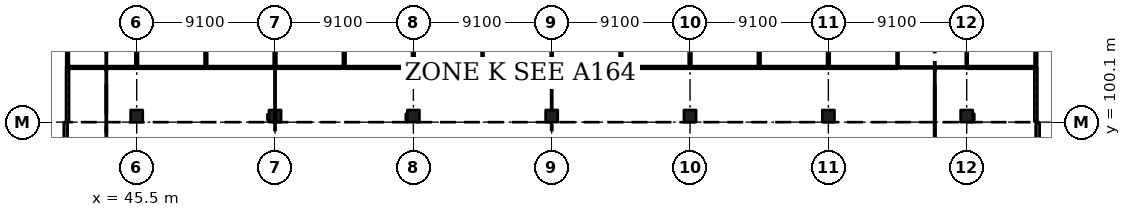
"""IFC4 building model, lengths in metres.
Left out: names, types, materials, properties, quantities, classifications, styles, units other than length and angle.
Written with IfcOpenShell. Run it as: python <this file> out.ifc"""

import sys

from ifc_helpers import new_model, si_unit, direction, frame, frame_2d, origin, origin_2d, place, context, subcontext, project, spatial, rectangle, extrude, element, fill, save


model = new_model("IFC4")
c1 = context("Model", 3, precision=1e-05, world=origin(), true_north=direction((0.0, 1.0)))
c2 = subcontext(c1, "Body", "Model", "MODEL_VIEW")
j1 = project(units=[si_unit("LENGTHUNIT", "METRE"), si_unit("PLANEANGLEUNIT", "RADIAN")], contexts=[c1])
p1 = place(None, origin())
s1 = spatial("IfcSite", under=j1, at=p1, CompositionType="ELEMENT")
p2 = place(p1, origin())
s2 = spatial("IfcBuilding", under=s1, at=p2, CompositionType="ELEMENT")
p3 = place(p2, frame((0.0, 0.0, 20.02)))
s3 = spatial("IfcBuildingStorey", under=s2, at=p3, CompositionType="ELEMENT", Elevation=20.02)
for number, where, z_axis, x_axis in (
    (1, (45.5, 100.5, 0.0), (0.0, 0.0, 1.0), (1.0, 0.0, 0.0)),
    (2, (54.6, 100.5, 0.0), (0.0, 0.0, 1.0), (1.0, 0.0, 0.0)),
    (3, (63.7, 100.5, 0.0), (0.0, 0.0, 1.0), (1.0, 0.0, 0.0)),
    (4, (72.8, 100.5, 0.0), (0.0, 0.0, 1.0), (1.0, 0.0, 0.0)),
    (5, (81.9, 100.5, 0.0), (0.0, 0.0, 1.0), (1.0, 0.0, 0.0)),
    (6, (91.0, 100.5, 0.0), (0.0, 0.0, 1.0), (1.0, 0.0, 0.0)),
    (7, (100.1, 100.5, 0.0), (0.0, 0.0, 1.0), (1.0, 0.0, 0.0)),
):
    element("IfcColumn", number, at=place(p3, frame(where, z_axis=z_axis, x_axis=x_axis)), inside=s3, PredefinedType="COLUMN", context=c2, shape_type="SweptSolid", body=[
        extrude(rectangle(XDim=0.8, YDim=0.8, at=origin_2d()), origin(), (0.0, 0.0, 1.0), 4.55),
    ])
for number, where, z_axis, x_axis in (
    (8, (40.825, 68.25, 0.0), (0.0, 0.0, 1.0), (0.0, 1.0, 0.0)),
    (9, (104.775, 68.25, 0.0), (0.0, 0.0, 1.0), (0.0, 1.0, 0.0)),
):
    element("IfcWall", number, at=place(p3, frame(where, z_axis=z_axis, x_axis=x_axis)), inside=s3, PredefinedType="SHEAR", context=c2, shape_type="SweptSolid", body=[
        extrude(rectangle(XDim=31.85, YDim=0.25, at=frame_2d((15.925, 0.0))), origin(), (0.0, 0.0, 1.0), 4.55),
    ])
p4 = place(p3, frame((40.95, 103.7, 0.0), z_axis=(0.0, 0.0, 1.0), x_axis=(0.0, -1.0, 0.0)))
e10 = element("IfcWall", 10, at=p4, inside=s3, PredefinedType="PARTITIONING", context=c2, shape_type="SweptSolid", body=[
    extrude(rectangle(XDim=3.57, YDim=0.2, at=frame_2d((1.785, 0.0))), origin(), (0.0, 0.0, 1.0), 4.25),
])
p5 = place(p4, frame((0.55, 0.0, 0.0)))
e11 = element("IfcOpeningElement", 11, at=p5, cuts=e10, PredefinedType="OPENING", context=c2, shape_type="SweptSolid", body=[
    extrude(rectangle(XDim=2.4, YDim=2.4, at=frame_2d((1.2, 1.2))), frame((0.0, 0.11, 0.0), z_axis=(0.0, -1.0, 0.0), x_axis=(1.0, 0.0, 0.0)), (0.0, 0.0, 1.0), 0.22),
])
p6 = place(p3, frame((40.95, 103.7, 0.0), z_axis=(0.0, 0.0, 1.0), x_axis=(0.0, 1.0, 0.0)))
e12 = element("IfcWall", 12, at=p6, inside=s3, PredefinedType="PARTITIONING", context=c2, shape_type="SweptSolid", body=[
    extrude(rectangle(XDim=5.47, YDim=0.175, at=frame_2d((2.735, 0.0))), origin(), (0.0, 0.0, 1.0), 4.25),
])
p7 = place(p3, frame((41.05, 103.7, 0.0), z_axis=(0.0, 0.0, 1.0), x_axis=(1.0, 0.0, 0.0)))
e13 = element("IfcWall", 13, at=p7, inside=s3, PredefinedType="PARTITIONING", context=c2, shape_type="SweptSolid", body=[
    extrude(rectangle(XDim=27.2, YDim=0.175, at=frame_2d((13.6, 0.0))), origin(), (0.0, 0.0, 1.0), 4.25),
])
p8 = place(p7, frame((1.65, 0.0, 0.0)))
e14 = element("IfcOpeningElement", 14, at=p8, cuts=e13, PredefinedType="OPENING", context=c2, shape_type="SweptSolid", body=[
    extrude(rectangle(XDim=1.1, YDim=2.4, at=frame_2d((0.55, 1.2))), frame((0.0, 0.097, 0.0), z_axis=(0.0, -1.0, 0.0), x_axis=(1.0, 0.0, 0.0)), (0.0, 0.0, 1.0), 0.195),
])
p9 = place(p7, frame((6.2, 0.0, 0.0)))
e15 = element("IfcOpeningElement", 15, at=p9, cuts=e13, PredefinedType="OPENING", context=c2, shape_type="SweptSolid", body=[
    extrude(rectangle(XDim=1.1, YDim=2.4, at=frame_2d((0.55, 1.2))), frame((0.0, 0.097, 0.0), z_axis=(0.0, -1.0, 0.0), x_axis=(1.0, 0.0, 0.0)), (0.0, 0.0, 1.0), 0.195),
])
p10 = place(p7, frame((10.75, 0.0, 0.0)))
e16 = element("IfcOpeningElement", 16, at=p10, cuts=e13, PredefinedType="OPENING", context=c2, shape_type="SweptSolid", body=[
    extrude(rectangle(XDim=1.1, YDim=2.4, at=frame_2d((0.55, 1.2))), frame((0.0, 0.097, 0.0), z_axis=(0.0, -1.0, 0.0), x_axis=(1.0, 0.0, 0.0)), (0.0, 0.0, 1.0), 0.195),
])
p11 = place(p7, frame((15.3, 0.0, 0.0)))
e17 = element("IfcOpeningElement", 17, at=p11, cuts=e13, PredefinedType="OPENING", context=c2, shape_type="SweptSolid", body=[
    extrude(rectangle(XDim=1.1, YDim=2.4, at=frame_2d((0.55, 1.2))), frame((0.0, 0.097, 0.0), z_axis=(0.0, -1.0, 0.0), x_axis=(1.0, 0.0, 0.0)), (0.0, 0.0, 1.0), 0.195),
])
p12 = place(p7, frame((19.85, 0.0, 0.0)))
e18 = element("IfcOpeningElement", 18, at=p12, cuts=e13, PredefinedType="OPENING", context=c2, shape_type="SweptSolid", body=[
    extrude(rectangle(XDim=1.1, YDim=2.4, at=frame_2d((0.55, 1.2))), frame((0.0, 0.097, 0.0), z_axis=(0.0, -1.0, 0.0), x_axis=(1.0, 0.0, 0.0)), (0.0, 0.0, 1.0), 0.195),
])
p13 = place(p7, frame((24.4, 0.0, 0.0)))
e19 = element("IfcOpeningElement", 19, at=p13, cuts=e13, PredefinedType="OPENING", context=c2, shape_type="SweptSolid", body=[
    extrude(rectangle(XDim=1.1, YDim=2.4, at=frame_2d((0.55, 1.2))), frame((0.0, 0.097, 0.0), z_axis=(0.0, -1.0, 0.0), x_axis=(1.0, 0.0, 0.0)), (0.0, 0.0, 1.0), 0.195),
])
p14 = place(p3, frame((45.5, 109.025, 0.0), z_axis=(0.0, 0.0, 1.0), x_axis=(0.0, -1.0, 0.0)))
e20 = element("IfcWall", 20, at=p14, inside=s3, PredefinedType="PARTITIONING", context=c2, shape_type="SweptSolid", body=[
    extrude(rectangle(XDim=5.237, YDim=0.175, at=frame_2d((2.619, 0.0))), origin(), (0.0, 0.0, 1.0), 3.55),
])
p15 = place(p3, frame((50.05, 109.17, 0.0), z_axis=(0.0, 0.0, 1.0), x_axis=(0.0, -1.0, 0.0)))
e21 = element("IfcWall", 21, at=p15, inside=s3, PredefinedType="PARTITIONING", context=c2, shape_type="SweptSolid", body=[
    extrude(rectangle(XDim=5.382, YDim=0.175, at=frame_2d((2.691, 0.0))), origin(), (0.0, 0.0, 1.0), 4.25),
])
p16 = place(p3, frame((54.2, 100.625, 0.0), z_axis=(0.0, 0.0, 1.0), x_axis=(0.0, -1.0, 0.0)))
e22 = element("IfcWall", 22, at=p16, inside=s3, PredefinedType="PARTITIONING", context=c2, shape_type="SweptSolid", body=[
    extrude(rectangle(XDim=0.4, YDim=0.2, at=frame_2d((0.2, 0.0))), origin(), (0.0, 0.0, 1.0), 4.25),
])
p17 = place(p3, frame((54.6, 109.0, 0.0), z_axis=(0.0, 0.0, 1.0), x_axis=(0.0, -1.0, 0.0)))
e23 = element("IfcWall", 23, at=p17, inside=s3, PredefinedType="PARTITIONING", context=c2, shape_type="SweptSolid", body=[
    extrude(rectangle(XDim=5.212, YDim=0.175, at=frame_2d((2.606, 0.0))), origin(), (0.0, 0.0, 1.0), 3.55),
])
p18 = place(p3, frame((59.15, 109.17, 0.0), z_axis=(0.0, 0.0, 1.0), x_axis=(0.0, -1.0, 0.0)))
e24 = element("IfcWall", 24, at=p18, inside=s3, PredefinedType="PARTITIONING", context=c2, shape_type="SweptSolid", body=[
    extrude(rectangle(XDim=5.382, YDim=0.175, at=frame_2d((2.691, 0.0))), origin(), (0.0, 0.0, 1.0), 4.25),
])
p19 = place(p3, frame((63.3, 100.65, 0.0), z_axis=(0.0, 0.0, 1.0), x_axis=(0.0, -1.0, 0.0)))
e25 = element("IfcWall", 25, at=p19, inside=s3, PredefinedType="PARTITIONING", context=c2, shape_type="SweptSolid", body=[
    extrude(rectangle(XDim=0.4, YDim=0.2, at=frame_2d((0.2, 0.0))), origin(), (0.0, 0.0, 1.0), 4.25),
])
p20 = place(p3, frame((63.7, 109.025, 0.0), z_axis=(0.0, 0.0, 1.0), x_axis=(0.0, -1.0, 0.0)))
e26 = element("IfcWall", 26, at=p20, inside=s3, PredefinedType="PARTITIONING", context=c2, shape_type="SweptSolid", body=[
    extrude(rectangle(XDim=5.237, YDim=0.175, at=frame_2d((2.619, 0.0))), origin(), (0.0, 0.0, 1.0), 3.55),
])
p21 = place(p3, frame((68.25, 103.7, 0.0), z_axis=(0.0, 0.0, 1.0), x_axis=(1.0, 0.0, 0.0)))
e27 = element("IfcWall", 27, at=p21, inside=s3, PredefinedType="PARTITIONING", context=c2, shape_type="SweptSolid", body=[
    extrude(rectangle(XDim=4.55, YDim=0.125, at=frame_2d((2.275, 0.0))), origin(), (0.0, 0.0, 1.0), 4.25),
])
p22 = place(p21, frame((1.85, 0.0, 0.0)))
e28 = element("IfcOpeningElement", 28, at=p22, cuts=e27, PredefinedType="OPENING", context=c2, shape_type="SweptSolid", body=[
    extrude(rectangle(XDim=0.9, YDim=2.1, at=frame_2d((0.45, 1.05))), frame((0.0, 0.073, 0.0), z_axis=(0.0, -1.0, 0.0), x_axis=(1.0, 0.0, 0.0)), (0.0, 0.0, 1.0), 0.145),
])
p23 = place(p3, frame((68.25, 109.17, 0.0), z_axis=(0.0, 0.0, 1.0), x_axis=(0.0, -1.0, 0.0)))
e29 = element("IfcWall", 29, at=p23, inside=s3, PredefinedType="PARTITIONING", context=c2, shape_type="SweptSolid", body=[
    extrude(rectangle(XDim=5.382, YDim=0.125, at=frame_2d((2.691, 0.0))), origin(), (0.0, 0.0, 1.0), 4.25),
])
p24 = place(p3, frame((72.8, 103.7, 0.0), z_axis=(0.0, 0.0, 1.0), x_axis=(1.0, 0.0, 0.0)))
e30 = element("IfcWall", 30, at=p24, inside=s3, PredefinedType="PARTITIONING", context=c2, shape_type="SweptSolid", body=[
    extrude(rectangle(XDim=22.75, YDim=0.175, at=frame_2d((11.375, 0.0))), origin(), (0.0, 0.0, 1.0), 4.25),
])
p25 = place(p24, frame((10.85, 0.0, 0.0)))
e31 = element("IfcOpeningElement", 31, at=p25, cuts=e30, PredefinedType="OPENING", context=c2, shape_type="SweptSolid", body=[
    extrude(rectangle(XDim=1.1, YDim=2.4, at=frame_2d((0.55, 1.2))), frame((0.0, 0.097, 0.0), z_axis=(0.0, -1.0, 0.0), x_axis=(1.0, 0.0, 0.0)), (0.0, 0.0, 1.0), 0.195),
])
p26 = place(p24, frame((15.4, 0.0, 0.0)))
e32 = element("IfcOpeningElement", 32, at=p26, cuts=e30, PredefinedType="OPENING", context=c2, shape_type="SweptSolid", body=[
    extrude(rectangle(XDim=1.1, YDim=2.4, at=frame_2d((0.55, 1.2))), frame((0.0, 0.097, 0.0), z_axis=(0.0, -1.0, 0.0), x_axis=(1.0, 0.0, 0.0)), (0.0, 0.0, 1.0), 0.195),
])
p27 = place(p24, frame((19.95, 0.0, 0.0)))
e33 = element("IfcOpeningElement", 33, at=p27, cuts=e30, PredefinedType="OPENING", context=c2, shape_type="SweptSolid", body=[
    extrude(rectangle(XDim=1.1, YDim=2.4, at=frame_2d((0.55, 1.2))), frame((0.0, 0.097, 0.0), z_axis=(0.0, -1.0, 0.0), x_axis=(1.0, 0.0, 0.0)), (0.0, 0.0, 1.0), 0.195),
])
p28 = place(p24, frame((1.75, 0.0, 0.0)))
e34 = element("IfcOpeningElement", 34, at=p28, cuts=e30, PredefinedType="OPENING", context=c2, shape_type="SweptSolid", body=[
    extrude(rectangle(XDim=1.1, YDim=2.4, at=frame_2d((0.55, 1.2))), frame((0.0, 0.097, 0.0), z_axis=(0.0, -1.0, 0.0), x_axis=(1.0, 0.0, 0.0)), (0.0, 0.0, 1.0), 0.195),
])
p29 = place(p24, frame((6.3, 0.0, 0.0)))
e35 = element("IfcOpeningElement", 35, at=p29, cuts=e30, PredefinedType="OPENING", context=c2, shape_type="SweptSolid", body=[
    extrude(rectangle(XDim=1.1, YDim=2.4, at=frame_2d((0.55, 1.2))), frame((0.0, 0.097, 0.0), z_axis=(0.0, -1.0, 0.0), x_axis=(1.0, 0.0, 0.0)), (0.0, 0.0, 1.0), 0.195),
])
p30 = place(p3, frame((72.8, 109.025, 0.0), z_axis=(0.0, 0.0, 1.0), x_axis=(0.0, -1.0, 0.0)))
e36 = element("IfcWall", 36, at=p30, inside=s3, PredefinedType="PARTITIONING", context=c2, shape_type="SweptSolid", body=[
    extrude(rectangle(XDim=5.237, YDim=0.125, at=frame_2d((2.619, 0.0))), origin(), (0.0, 0.0, 1.0), 3.55),
])
p31 = place(p3, frame((77.35, 109.17, 0.0), z_axis=(0.0, 0.0, 1.0), x_axis=(0.0, -1.0, 0.0)))
e37 = element("IfcWall", 37, at=p31, inside=s3, PredefinedType="PARTITIONING", context=c2, shape_type="SweptSolid", body=[
    extrude(rectangle(XDim=5.382, YDim=0.175, at=frame_2d((2.691, 0.0))), origin(), (0.0, 0.0, 1.0), 4.25),
])
p32 = place(p3, frame((81.9, 109.0, 0.0), z_axis=(0.0, 0.0, 1.0), x_axis=(0.0, -1.0, 0.0)))
e38 = element("IfcWall", 38, at=p32, inside=s3, PredefinedType="PARTITIONING", context=c2, shape_type="SweptSolid", body=[
    extrude(rectangle(XDim=5.212, YDim=0.175, at=frame_2d((2.606, 0.0))), origin(), (0.0, 0.0, 1.0), 3.55),
])
p33 = place(p3, frame((86.45, 109.17, 0.0), z_axis=(0.0, 0.0, 1.0), x_axis=(0.0, -1.0, 0.0)))
e39 = element("IfcWall", 39, at=p33, inside=s3, PredefinedType="PARTITIONING", context=c2, shape_type="SweptSolid", body=[
    extrude(rectangle(XDim=5.382, YDim=0.175, at=frame_2d((2.691, 0.0))), origin(), (0.0, 0.0, 1.0), 4.25),
])
p34 = place(p3, frame((91.0, 109.025, 0.0), z_axis=(0.0, 0.0, 1.0), x_axis=(0.0, -1.0, 0.0)))
e40 = element("IfcWall", 40, at=p34, inside=s3, PredefinedType="PARTITIONING", context=c2, shape_type="SweptSolid", body=[
    extrude(rectangle(XDim=5.237, YDim=0.175, at=frame_2d((2.619, 0.0))), origin(), (0.0, 0.0, 1.0), 3.55),
])
p35 = place(p3, frame((95.55, 103.7, 0.0), z_axis=(0.0, 0.0, 1.0), x_axis=(1.0, 0.0, 0.0)))
e41 = element("IfcWall", 41, at=p35, inside=s3, PredefinedType="PARTITIONING", context=c2, shape_type="SweptSolid", body=[
    extrude(rectangle(XDim=4.55, YDim=0.125, at=frame_2d((2.275, 0.0))), origin(), (0.0, 0.0, 1.0), 4.25),
])
p36 = place(p35, frame((1.75, 0.0, 0.0)))
e42 = element("IfcOpeningElement", 42, at=p36, cuts=e41, PredefinedType="OPENING", context=c2, shape_type="SweptSolid", body=[
    extrude(rectangle(XDim=1.0, YDim=2.1, at=frame_2d((0.5, 1.05))), frame((0.0, 0.073, 0.0), z_axis=(0.0, -1.0, 0.0), x_axis=(1.0, 0.0, 0.0)), (0.0, 0.0, 1.0), 0.145),
])
p37 = place(p3, frame((95.55, 109.17, 0.0), z_axis=(0.0, 0.0, 1.0), x_axis=(0.0, -1.0, 0.0)))
e43 = element("IfcWall", 43, at=p37, inside=s3, PredefinedType="PARTITIONING", context=c2, shape_type="SweptSolid", body=[
    extrude(rectangle(XDim=5.382, YDim=0.125, at=frame_2d((2.691, 0.0))), origin(), (0.0, 0.0, 1.0), 4.25),
])
p38 = place(p3, frame((100.1, 103.7, 0.0), z_axis=(0.0, 0.0, 1.0), x_axis=(1.0, 0.0, 0.0)))
e44 = element("IfcWall", 44, at=p38, inside=s3, PredefinedType="PARTITIONING", context=c2, shape_type="SweptSolid", body=[
    extrude(rectangle(XDim=4.45, YDim=0.175, at=frame_2d((2.225, 0.0))), origin(), (0.0, 0.0, 1.0), 4.25),
])
p39 = place(p38, frame((1.65, 0.0, 0.0)))
e45 = element("IfcOpeningElement", 45, at=p39, cuts=e44, PredefinedType="OPENING", context=c2, shape_type="SweptSolid", body=[
    extrude(rectangle(XDim=1.1, YDim=2.4, at=frame_2d((0.55, 1.2))), frame((0.0, 0.097, 0.0), z_axis=(0.0, -1.0, 0.0), x_axis=(1.0, 0.0, 0.0)), (0.0, 0.0, 1.0), 0.195),
])
p40 = place(p3, frame((100.1, 109.025, 0.0), z_axis=(0.0, 0.0, 1.0), x_axis=(0.0, -1.0, 0.0)))
e46 = element("IfcWall", 46, at=p40, inside=s3, PredefinedType="PARTITIONING", context=c2, shape_type="SweptSolid", body=[
    extrude(rectangle(XDim=5.237, YDim=0.125, at=frame_2d((2.619, 0.0))), origin(), (0.0, 0.0, 1.0), 3.55),
])
p41 = place(p3, frame((100.5, 100.25, 0.0), z_axis=(0.0, 0.0, 1.0), x_axis=(0.0, 1.0, 0.0)))
e47 = element("IfcWall", 47, at=p41, inside=s3, PredefinedType="PARTITIONING", context=c2, shape_type="SweptSolid", body=[
    extrude(rectangle(XDim=0.4, YDim=0.2, at=frame_2d((0.2, 0.0))), origin(), (0.0, 0.0, 1.0), 4.25),
])
p42 = place(p3, frame((104.65, 100.13, 0.0), z_axis=(0.0, 0.0, 1.0), x_axis=(0.0, 1.0, 0.0)))
e48 = element("IfcWall", 48, at=p42, inside=s3, PredefinedType="PARTITIONING", context=c2, shape_type="SweptSolid", body=[
    extrude(rectangle(XDim=3.57, YDim=0.2, at=frame_2d((1.785, 0.0))), origin(), (0.0, 0.0, 1.0), 4.25),
])
p43 = place(p42, frame((0.55, 0.0, 0.0)))
e49 = element("IfcOpeningElement", 49, at=p43, cuts=e48, PredefinedType="OPENING", context=c2, shape_type="SweptSolid", body=[
    extrude(rectangle(XDim=2.4, YDim=2.4, at=frame_2d((1.2, 1.2))), frame((0.0, 0.11, 0.0), z_axis=(0.0, -1.0, 0.0), x_axis=(1.0, 0.0, 0.0)), (0.0, 0.0, 1.0), 0.22),
])
p44 = place(p3, frame((104.65, 103.7, 0.0), z_axis=(0.0, 0.0, 1.0), x_axis=(0.0, 1.0, 0.0)))
e50 = element("IfcWall", 50, at=p44, inside=s3, PredefinedType="PARTITIONING", context=c2, shape_type="SweptSolid", body=[
    extrude(rectangle(XDim=5.47, YDim=0.175, at=frame_2d((2.735, 0.0))), origin(), (0.0, 0.0, 1.0), 4.25),
])
p45 = place(p8, origin())
e51 = element("IfcDoor", 51, at=p45, inside=s3, OperationType="SINGLE_SWING_RIGHT", PredefinedType="DOOR", context=c2, shape_type="SweptSolid", body=[
    extrude(rectangle(XDim=1.1, YDim=2.4, at=frame_2d((0.55, 1.2))), frame((0.0, 0.025, 0.0), z_axis=(0.0, -1.0, 0.0), x_axis=(1.0, 0.0, 0.0)), (0.0, 0.0, 1.0), 0.05),
])
fill(e14, e51)
p46 = place(p25, origin())
e52 = element("IfcDoor", 52, at=p46, inside=s3, OperationType="SINGLE_SWING_LEFT", PredefinedType="DOOR", context=c2, shape_type="SweptSolid", body=[
    extrude(rectangle(XDim=1.1, YDim=2.4, at=frame_2d((0.55, 1.2))), frame((0.0, 0.025, 0.0), z_axis=(0.0, -1.0, 0.0), x_axis=(1.0, 0.0, 0.0)), (0.0, 0.0, 1.0), 0.05),
])
fill(e31, e52)
p47 = place(p26, origin())
e53 = element("IfcDoor", 53, at=p47, inside=s3, OperationType="SINGLE_SWING_LEFT", PredefinedType="DOOR", context=c2, shape_type="SweptSolid", body=[
    extrude(rectangle(XDim=1.1, YDim=2.4, at=frame_2d((0.55, 1.2))), frame((0.0, 0.025, 0.0), z_axis=(0.0, -1.0, 0.0), x_axis=(1.0, 0.0, 0.0)), (0.0, 0.0, 1.0), 0.05),
])
fill(e32, e53)
p48 = place(p27, origin())
e54 = element("IfcDoor", 54, at=p48, inside=s3, OperationType="SINGLE_SWING_LEFT", PredefinedType="DOOR", context=c2, shape_type="SweptSolid", body=[
    extrude(rectangle(XDim=1.1, YDim=2.4, at=frame_2d((0.55, 1.2))), frame((0.0, 0.025, 0.0), z_axis=(0.0, -1.0, 0.0), x_axis=(1.0, 0.0, 0.0)), (0.0, 0.0, 1.0), 0.05),
])
fill(e33, e54)
p49 = place(p36, origin())
e55 = element("IfcDoor", 55, at=p49, inside=s3, OperationType="SINGLE_SWING_RIGHT", PredefinedType="DOOR", context=c2, shape_type="SweptSolid", body=[
    extrude(rectangle(XDim=1.0, YDim=2.1, at=frame_2d((0.5, 1.05))), frame((0.0, 0.025, 0.0), z_axis=(0.0, -1.0, 0.0), x_axis=(1.0, 0.0, 0.0)), (0.0, 0.0, 1.0), 0.05),
])
fill(e42, e55)
p50 = place(p39, origin())
e56 = element("IfcDoor", 56, at=p50, inside=s3, OperationType="SINGLE_SWING_RIGHT", PredefinedType="DOOR", context=c2, shape_type="SweptSolid", body=[
    extrude(rectangle(XDim=1.1, YDim=2.4, at=frame_2d((0.55, 1.2))), frame((0.0, 0.025, 0.0), z_axis=(0.0, -1.0, 0.0), x_axis=(1.0, 0.0, 0.0)), (0.0, 0.0, 1.0), 0.05),
])
fill(e45, e56)
p51 = place(p9, origin())
e57 = element("IfcDoor", 57, at=p51, inside=s3, OperationType="SINGLE_SWING_LEFT", PredefinedType="DOOR", context=c2, shape_type="SweptSolid", body=[
    extrude(rectangle(XDim=1.1, YDim=2.4, at=frame_2d((0.55, 1.2))), frame((0.0, 0.025, 0.0), z_axis=(0.0, -1.0, 0.0), x_axis=(1.0, 0.0, 0.0)), (0.0, 0.0, 1.0), 0.05),
])
fill(e15, e57)
p52 = place(p10, origin())
e58 = element("IfcDoor", 58, at=p52, inside=s3, OperationType="SINGLE_SWING_LEFT", PredefinedType="DOOR", context=c2, shape_type="SweptSolid", body=[
    extrude(rectangle(XDim=1.1, YDim=2.4, at=frame_2d((0.55, 1.2))), frame((0.0, 0.025, 0.0), z_axis=(0.0, -1.0, 0.0), x_axis=(1.0, 0.0, 0.0)), (0.0, 0.0, 1.0), 0.05),
])
fill(e16, e58)
p53 = place(p11, origin())
e59 = element("IfcDoor", 59, at=p53, inside=s3, OperationType="SINGLE_SWING_LEFT", PredefinedType="DOOR", context=c2, shape_type="SweptSolid", body=[
    extrude(rectangle(XDim=1.1, YDim=2.4, at=frame_2d((0.55, 1.2))), frame((0.0, 0.025, 0.0), z_axis=(0.0, -1.0, 0.0), x_axis=(1.0, 0.0, 0.0)), (0.0, 0.0, 1.0), 0.05),
])
fill(e17, e59)
p54 = place(p12, origin())
e60 = element("IfcDoor", 60, at=p54, inside=s3, OperationType="SINGLE_SWING_LEFT", PredefinedType="DOOR", context=c2, shape_type="SweptSolid", body=[
    extrude(rectangle(XDim=1.1, YDim=2.4, at=frame_2d((0.55, 1.2))), frame((0.0, 0.025, 0.0), z_axis=(0.0, -1.0, 0.0), x_axis=(1.0, 0.0, 0.0)), (0.0, 0.0, 1.0), 0.05),
])
fill(e18, e60)
p55 = place(p13, origin())
e61 = element("IfcDoor", 61, at=p55, inside=s3, OperationType="SINGLE_SWING_LEFT", PredefinedType="DOOR", context=c2, shape_type="SweptSolid", body=[
    extrude(rectangle(XDim=1.1, YDim=2.4, at=frame_2d((0.55, 1.2))), frame((0.0, 0.025, 0.0), z_axis=(0.0, -1.0, 0.0), x_axis=(1.0, 0.0, 0.0)), (0.0, 0.0, 1.0), 0.05),
])
fill(e19, e61)
p56 = place(p22, origin())
e62 = element("IfcDoor", 62, at=p56, inside=s3, OperationType="SINGLE_SWING_LEFT", PredefinedType="DOOR", context=c2, shape_type="SweptSolid", body=[
    extrude(rectangle(XDim=0.9, YDim=2.1, at=frame_2d((0.45, 1.05))), frame((0.0, 0.025, 0.0), z_axis=(0.0, -1.0, 0.0), x_axis=(1.0, 0.0, 0.0)), (0.0, 0.0, 1.0), 0.05),
])
fill(e28, e62)
p57 = place(p28, origin())
e63 = element("IfcDoor", 63, at=p57, inside=s3, OperationType="SINGLE_SWING_LEFT", PredefinedType="DOOR", context=c2, shape_type="SweptSolid", body=[
    extrude(rectangle(XDim=1.1, YDim=2.4, at=frame_2d((0.55, 1.2))), frame((0.0, 0.025, 0.0), z_axis=(0.0, -1.0, 0.0), x_axis=(1.0, 0.0, 0.0)), (0.0, 0.0, 1.0), 0.05),
])
fill(e34, e63)
p58 = place(p29, origin())
e64 = element("IfcDoor", 64, at=p58, inside=s3, OperationType="SINGLE_SWING_LEFT", PredefinedType="DOOR", context=c2, shape_type="SweptSolid", body=[
    extrude(rectangle(XDim=1.1, YDim=2.4, at=frame_2d((0.55, 1.2))), frame((0.0, 0.025, 0.0), z_axis=(0.0, -1.0, 0.0), x_axis=(1.0, 0.0, 0.0)), (0.0, 0.0, 1.0), 0.05),
])
fill(e35, e64)
p59 = place(p43, origin())
e65 = element("IfcDoor", 65, at=p59, inside=s3, OperationType="DOUBLE_DOOR_SINGLE_SWING", PredefinedType="DOOR", context=c2, shape_type="SweptSolid", body=[
    extrude(rectangle(XDim=2.4, YDim=2.4, at=frame_2d((1.2, 1.2))), frame((0.0, 0.025, 0.0), z_axis=(0.0, -1.0, 0.0), x_axis=(1.0, 0.0, 0.0)), (0.0, 0.0, 1.0), 0.05),
])
fill(e49, e65)
p60 = place(p5, origin())
e66 = element("IfcDoor", 66, at=p60, inside=s3, OperationType="DOUBLE_DOOR_SINGLE_SWING", PredefinedType="DOOR", context=c2, shape_type="SweptSolid", body=[
    extrude(rectangle(XDim=2.4, YDim=2.4, at=frame_2d((1.2, 1.2))), frame((0.0, 0.025, 0.0), z_axis=(0.0, -1.0, 0.0), x_axis=(1.0, 0.0, 0.0)), (0.0, 0.0, 1.0), 0.05),
])
fill(e11, e66)
save(model, sys.argv[1])
